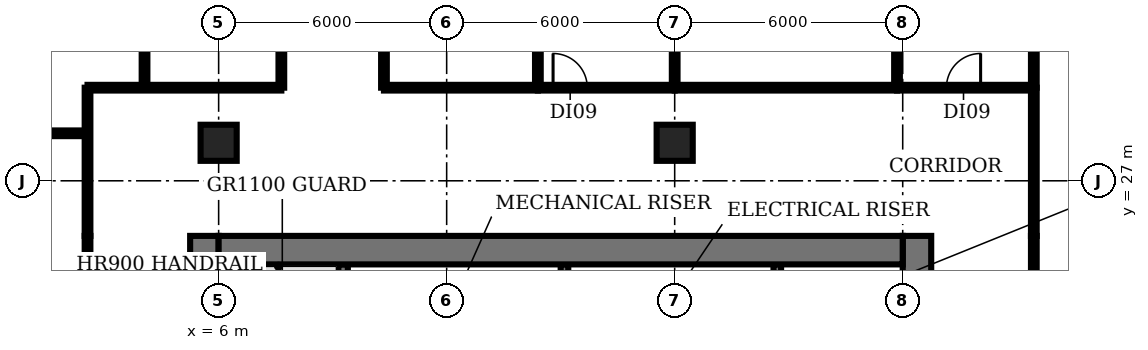
"""IFC4 building model, lengths in metres.
Left out: names, types, materials, properties, quantities, classifications, styles, units other than length and angle.
Written with IfcOpenShell. Run it as: python <this file> out.ifc"""

import sys

from ifc_helpers import new_model, si_unit, direction, frame, frame_2d, origin, origin_2d, place, context, subcontext, project, spatial, rectangle, extrude, element, fill, save


model = new_model("IFC4")
c1 = context("Model", 3, precision=1e-05, world=origin(), true_north=direction((0.0, 1.0)))
c2 = subcontext(c1, "Body", "Model", "MODEL_VIEW")
j1 = project(units=[si_unit("LENGTHUNIT", "METRE"), si_unit("PLANEANGLEUNIT", "RADIAN")], contexts=[c1])
p1 = place(None, origin())
s1 = spatial("IfcSite", under=j1, at=p1, CompositionType="ELEMENT")
p2 = place(p1, origin())
s2 = spatial("IfcBuilding", under=s1, at=p2, CompositionType="ELEMENT")
p3 = place(p2, frame((0.0, 0.0, 87.8)))
s3 = spatial("IfcBuildingStorey", under=s2, at=p3, CompositionType="ELEMENT", Elevation=87.8)
for number, where, z_axis, x_axis in (
    (1, (6.0, 28.0, -0.35), (0.0, 0.0, 1.0), (1.0, 0.0, 0.0)),
    (2, (18.0, 28.0, -0.35), (0.0, 0.0, 1.0), (1.0, 0.0, 0.0)),
):
    element("IfcColumn", number, at=place(p3, frame(where, z_axis=z_axis, x_axis=x_axis)), inside=s3, PredefinedType="COLUMN", context=c2, shape_type="SweptSolid", body=[
        extrude(rectangle(XDim=0.95, YDim=0.95, at=origin_2d()), origin(), (0.0, 0.0, 1.0), 4.2),
    ])
p4 = place(p3, frame((9.275, 18.375, 0.0), z_axis=(0.0, 0.0, 1.0), x_axis=(0.0, 1.0, 0.0)))
e3 = element("IfcWall", 3, at=p4, inside=s3, PredefinedType="SHEAR", context=c2, shape_type="SweptSolid", body=[
    extrude(rectangle(XDim=6.425, YDim=0.25, at=frame_2d((3.212, 0.0))), origin(), (0.0, 0.0, 1.0), 3.85),
])
for number, where, z_axis, x_axis in (
    (4, (15.1, 22.9, 0.0), (0.0, 0.0, 1.0), (0.0, 1.0, 0.0)),
    (5, (20.7, 22.9, 0.0), (0.0, 0.0, 1.0), (0.0, 1.0, 0.0)),
):
    element("IfcWall", number, at=place(p3, frame(where, z_axis=z_axis, x_axis=x_axis)), inside=s3, PredefinedType="SHEAR", context=c2, shape_type="SweptSolid", body=[
        extrude(rectangle(XDim=1.9, YDim=0.2, at=frame_2d((0.95, 0.0))), origin(), (0.0, 0.0, 1.0), 3.85),
    ])
p5 = place(p3, frame((5.625, 4.52, 0.0), z_axis=(0.0, 0.0, 1.0), x_axis=(0.0, 1.0, 0.0)))
e6 = element("IfcWall", 6, at=p5, inside=s3, PredefinedType="SHEAR", context=c2, shape_type="SweptSolid", body=[
    extrude(rectangle(XDim=21.03, YDim=0.75, at=frame_2d((10.515, 0.0))), origin(), (0.0, 0.0, 1.0), 3.85),
])
p6 = place(p5, frame((1.13, 0.0, 0.0)))
e7 = element("IfcOpeningElement", 7, at=p6, cuts=e6, PredefinedType="OPENING", context=c2, shape_type="SweptSolid", body=[
    extrude(rectangle(XDim=1.5, YDim=2.1, at=frame_2d((0.75, 1.05))), frame((0.0, 0.385, 0.0), z_axis=(0.0, -1.0, 0.0), x_axis=(1.0, 0.0, 0.0)), (0.0, 0.0, 1.0), 0.77),
])
p7 = place(p5, frame((7.58, 0.0, 0.0)))
e8 = element("IfcOpeningElement", 8, at=p7, cuts=e6, PredefinedType="OPENING", context=c2, shape_type="SweptSolid", body=[
    extrude(rectangle(XDim=1.2, YDim=2.1, at=frame_2d((0.6, 1.05))), frame((0.0, 0.385, 0.0), z_axis=(0.0, -1.0, 0.0), x_axis=(1.0, 0.0, 0.0)), (0.0, 0.0, 1.0), 0.77),
])
p8 = place(p5, frame((14.13, 0.0, 0.0)))
e9 = element("IfcOpeningElement", 9, at=p8, cuts=e6, PredefinedType="OPENING", context=c2, shape_type="SweptSolid", body=[
    extrude(rectangle(XDim=1.2, YDim=2.1, at=frame_2d((0.6, 1.05))), frame((0.0, 0.385, 0.0), z_axis=(0.0, -1.0, 0.0), x_axis=(1.0, 0.0, 0.0)), (0.0, 0.0, 1.0), 0.77),
])
p9 = place(p3, frame((24.375, 25.55, 0.0), z_axis=(0.0, 0.0, 1.0), x_axis=(0.0, -1.0, 0.0)))
e10 = element("IfcWall", 10, at=p9, inside=s3, PredefinedType="SHEAR", context=c2, shape_type="SweptSolid", body=[
    extrude(rectangle(XDim=21.08, YDim=0.75, at=frame_2d((10.54, 0.0))), origin(), (0.0, 0.0, 1.0), 3.85),
])
p10 = place(p9, frame((18.4, 0.0, 0.0)))
e11 = element("IfcOpeningElement", 11, at=p10, cuts=e10, PredefinedType="OPENING", context=c2, shape_type="SweptSolid", body=[
    extrude(rectangle(XDim=1.5, YDim=2.1, at=frame_2d((0.75, 1.05))), frame((0.0, 0.385, 0.0), z_axis=(0.0, -1.0, 0.0), x_axis=(1.0, 0.0, 0.0)), (0.0, 0.0, 1.0), 0.77),
])
p11 = place(p9, frame((12.3, 0.0, 0.0)))
e12 = element("IfcOpeningElement", 12, at=p11, cuts=e10, PredefinedType="OPENING", context=c2, shape_type="SweptSolid", body=[
    extrude(rectangle(XDim=0.9, YDim=2.1, at=frame_2d((0.45, 1.05))), frame((0.0, 0.385, 0.0), z_axis=(0.0, -1.0, 0.0), x_axis=(1.0, 0.0, 0.0)), (0.0, 0.0, 1.0), 0.77),
])
p12 = place(p9, frame((6.3, 0.0, 0.0)))
e13 = element("IfcOpeningElement", 13, at=p12, cuts=e10, PredefinedType="OPENING", context=c2, shape_type="SweptSolid", body=[
    extrude(rectangle(XDim=2.0, YDim=2.1, at=frame_2d((1.0, 1.05))), frame((0.0, 0.385, 0.0), z_axis=(0.0, -1.0, 0.0), x_axis=(1.0, 0.0, 0.0)), (0.0, 0.0, 1.0), 0.77),
])
p13 = place(p3, frame((6.0, 25.175, 0.0), z_axis=(0.0, 0.0, 1.0), x_axis=(1.0, 0.0, 0.0)))
e14 = element("IfcWall", 14, at=p13, inside=s3, PredefinedType="SHEAR", context=c2, shape_type="SweptSolid", body=[
    extrude(rectangle(XDim=18.0, YDim=0.75, at=frame_2d((9.0, 0.0))), origin(), (0.0, 0.0, 1.0), 3.85),
])
p14 = place(p3, frame((-1.04, 28.25, 0.0), z_axis=(0.0, 0.0, 1.0), x_axis=(1.0, 0.0, 0.0)))
e15 = element("IfcWall", 15, at=p14, inside=s3, PredefinedType="PARTITIONING", context=c2, shape_type="SweptSolid", body=[
    extrude(rectangle(XDim=3.59, YDim=0.15, at=frame_2d((1.795, 0.0))), origin(), (0.0, 0.0, 1.0), 2.83),
])
p15 = place(p3, frame((2.55, 5.999, 0.0), z_axis=(0.0, 0.0, 1.0), x_axis=(0.0, 1.0, 0.0)))
e16 = element("IfcWall", 16, at=p15, inside=s3, PredefinedType="PARTITIONING", context=c2, shape_type="SweptSolid", body=[
    extrude(rectangle(XDim=19.551, YDim=0.15, at=frame_2d((9.775, 0.0))), origin(), (0.0, 0.0, 1.0), 2.83),
])
p16 = place(p15, frame((7.651, 0.0, 0.0)))
e17 = element("IfcOpeningElement", 17, at=p16, cuts=e16, PredefinedType="OPENING", context=c2, shape_type="SweptSolid", body=[
    extrude(rectangle(XDim=1.2, YDim=2.1, at=frame_2d((0.6, 1.05))), frame((0.0, 0.085, 0.0), z_axis=(0.0, -1.0, 0.0), x_axis=(1.0, 0.0, 0.0)), (0.0, 0.0, 1.0), 0.17),
])
p17 = place(p3, frame((2.55, 25.55, 0.0), z_axis=(0.0, 0.0, 1.0), x_axis=(0.0, 1.0, 0.0)))
e18 = element("IfcWall", 18, at=p17, inside=s3, PredefinedType="PARTITIONING", context=c2, shape_type="SweptSolid", body=[
    extrude(rectangle(XDim=3.9, YDim=0.15, at=frame_2d((1.95, 0.0))), origin(), (0.0, 0.0, 1.0), 2.83),
])
p18 = place(p3, frame((2.55, 29.45, 0.0), z_axis=(0.0, 0.0, 1.0), x_axis=(1.0, 0.0, 0.0)))
e19 = element("IfcWall", 19, at=p18, inside=s3, PredefinedType="PARTITIONING", context=c2, shape_type="SweptSolid", body=[
    extrude(rectangle(XDim=5.1, YDim=0.15, at=frame_2d((2.55, 0.0))), origin(), (0.0, 0.0, 1.0), 2.83),
])
p19 = place(p3, frame((4.05, 29.45, 0.0), z_axis=(0.0, 0.0, 1.0), x_axis=(0.0, 1.0, 0.0)))
e20 = element("IfcWall", 20, at=p19, inside=s3, PredefinedType="PARTITIONING", context=c2, shape_type="SweptSolid", body=[
    extrude(rectangle(XDim=4.8, YDim=0.15, at=frame_2d((2.4, 0.0))), origin(), (0.0, 0.0, 1.0), 2.83),
])
p20 = place(p3, frame((7.65, 29.45, 0.0), z_axis=(0.0, 0.0, 1.0), x_axis=(0.0, 1.0, 0.0)))
e21 = element("IfcWall", 21, at=p20, inside=s3, PredefinedType="PARTITIONING", context=c2, shape_type="SweptSolid", body=[
    extrude(rectangle(XDim=4.8, YDim=0.15, at=frame_2d((2.4, 0.0))), origin(), (0.0, 0.0, 1.0), 2.83),
])
p21 = place(p20, frame((1.9, 0.0, 0.0)))
e22 = element("IfcOpeningElement", 22, at=p21, cuts=e21, PredefinedType="OPENING", context=c2, shape_type="SweptSolid", body=[
    extrude(rectangle(XDim=0.9, YDim=2.1, at=frame_2d((0.45, 1.05))), frame((0.0, 0.085, 0.0), z_axis=(0.0, -1.0, 0.0), x_axis=(1.0, 0.0, 0.0)), (0.0, 0.0, 1.0), 0.17),
])
p22 = place(p3, frame((10.35, 29.45, 0.0), z_axis=(0.0, 0.0, 1.0), x_axis=(0.0, 1.0, 0.0)))
e23 = element("IfcWall", 23, at=p22, inside=s3, PredefinedType="PARTITIONING", context=c2, shape_type="SweptSolid", body=[
    extrude(rectangle(XDim=4.8, YDim=0.15, at=frame_2d((2.4, 0.0))), origin(), (0.0, 0.0, 1.0), 2.83),
])
p23 = place(p3, frame((10.35, 29.45, 0.0), z_axis=(0.0, 0.0, 1.0), x_axis=(1.0, 0.0, 0.0)))
e24 = element("IfcWall", 24, at=p23, inside=s3, PredefinedType="PARTITIONING", context=c2, shape_type="SweptSolid", body=[
    extrude(rectangle(XDim=4.05, YDim=0.15, at=frame_2d((2.025, 0.0))), origin(), (0.0, 0.0, 1.0), 2.83),
])
p24 = place(p3, frame((14.4, 29.45, 0.0), z_axis=(0.0, 0.0, 1.0), x_axis=(0.0, 1.0, 0.0)))
e25 = element("IfcWall", 25, at=p24, inside=s3, PredefinedType="PARTITIONING", context=c2, shape_type="SweptSolid", body=[
    extrude(rectangle(XDim=4.8, YDim=0.15, at=frame_2d((2.4, 0.0))), origin(), (0.0, 0.0, 1.0), 2.83),
])
p25 = place(p3, frame((14.4, 29.45, 0.0), z_axis=(0.0, 0.0, 1.0), x_axis=(1.0, 0.0, 0.0)))
e26 = element("IfcWall", 26, at=p25, inside=s3, PredefinedType="PARTITIONING", context=c2, shape_type="SweptSolid", body=[
    extrude(rectangle(XDim=3.6, YDim=0.15, at=frame_2d((1.8, 0.0))), origin(), (0.0, 0.0, 1.0), 2.83),
])
p26 = place(p25, frame((0.4, 0.0, 0.0)))
e27 = element("IfcOpeningElement", 27, at=p26, cuts=e26, PredefinedType="OPENING", context=c2, shape_type="SweptSolid", body=[
    extrude(rectangle(XDim=0.9, YDim=2.1, at=frame_2d((0.45, 1.05))), frame((0.0, 0.085, 0.0), z_axis=(0.0, -1.0, 0.0), x_axis=(1.0, 0.0, 0.0)), (0.0, 0.0, 1.0), 0.17),
])
p27 = place(p3, frame((18.0, 29.45, 0.0), z_axis=(0.0, 0.0, 1.0), x_axis=(0.0, 1.0, 0.0)))
e28 = element("IfcWall", 28, at=p27, inside=s3, PredefinedType="PARTITIONING", context=c2, shape_type="SweptSolid", body=[
    extrude(rectangle(XDim=4.8, YDim=0.15, at=frame_2d((2.4, 0.0))), origin(), (0.0, 0.0, 1.0), 2.83),
])
p28 = place(p3, frame((18.0, 29.45, 0.0), z_axis=(0.0, 0.0, 1.0), x_axis=(1.0, 0.0, 0.0)))
e29 = element("IfcWall", 29, at=p28, inside=s3, PredefinedType="PARTITIONING", context=c2, shape_type="SweptSolid", body=[
    extrude(rectangle(XDim=5.85, YDim=0.15, at=frame_2d((2.925, 0.0))), origin(), (0.0, 0.0, 1.0), 2.83),
])
p29 = place(p3, frame((23.85, 29.45, 0.0), z_axis=(0.0, 0.0, 1.0), x_axis=(0.0, 1.0, 0.0)))
e30 = element("IfcWall", 30, at=p29, inside=s3, PredefinedType="PARTITIONING", context=c2, shape_type="SweptSolid", body=[
    extrude(rectangle(XDim=4.8, YDim=0.15, at=frame_2d((2.4, 0.0))), origin(), (0.0, 0.0, 1.0), 2.83),
])
p30 = place(p3, frame((23.85, 29.45, 0.0), z_axis=(0.0, 0.0, 1.0), x_axis=(1.0, 0.0, 0.0)))
e31 = element("IfcWall", 31, at=p30, inside=s3, PredefinedType="PARTITIONING", context=c2, shape_type="SweptSolid", body=[
    extrude(rectangle(XDim=3.6, YDim=0.15, at=frame_2d((1.8, 0.0))), origin(), (0.0, 0.0, 1.0), 2.83),
])
p31 = place(p30, frame((1.3, 0.0, 0.0)))
e32 = element("IfcOpeningElement", 32, at=p31, cuts=e31, PredefinedType="OPENING", context=c2, shape_type="SweptSolid", body=[
    extrude(rectangle(XDim=0.9, YDim=2.1, at=frame_2d((0.45, 1.05))), frame((0.0, 0.085, 0.0), z_axis=(0.0, -1.0, 0.0), x_axis=(1.0, 0.0, 0.0)), (0.0, 0.0, 1.0), 0.17),
])
p32 = place(p3, frame((27.45, 25.55, 0.0), z_axis=(0.0, 0.0, 1.0), x_axis=(0.0, -1.0, 0.0)))
e33 = element("IfcWall", 33, at=p32, inside=s3, PredefinedType="PARTITIONING", context=c2, shape_type="SweptSolid", body=[
    extrude(rectangle(XDim=16.45, YDim=0.15, at=frame_2d((8.225, 0.0))), origin(), (0.0, 0.0, 1.0), 2.83),
])
p33 = place(p32, frame((7.55, 0.0, 0.0)))
e34 = element("IfcOpeningElement", 34, at=p33, cuts=e33, PredefinedType="OPENING", context=c2, shape_type="SweptSolid", body=[
    extrude(rectangle(XDim=1.2, YDim=2.1, at=frame_2d((0.6, 1.05))), frame((0.0, 0.085, 0.0), z_axis=(0.0, -1.0, 0.0), x_axis=(1.0, 0.0, 0.0)), (0.0, 0.0, 1.0), 0.17),
])
p34 = place(p3, frame((27.45, 25.55, 0.0), z_axis=(0.0, 0.0, 1.0), x_axis=(0.0, 1.0, 0.0)))
e35 = element("IfcWall", 35, at=p34, inside=s3, PredefinedType="PARTITIONING", context=c2, shape_type="SweptSolid", body=[
    extrude(rectangle(XDim=3.9, YDim=0.15, at=frame_2d((1.95, 0.0))), origin(), (0.0, 0.0, 1.0), 2.83),
])
p35 = place(p3, frame((27.45, 29.45, 0.0), z_axis=(0.0, 0.0, 1.0), x_axis=(0.0, 1.0, 0.0)))
e36 = element("IfcWall", 36, at=p35, inside=s3, PredefinedType="PARTITIONING", context=c2, shape_type="SweptSolid", body=[
    extrude(rectangle(XDim=3.1, YDim=0.15, at=frame_2d((1.55, 0.0))), origin(), (0.0, 0.0, 1.0), 2.83),
])
p36 = place(p26, origin())
e37 = element("IfcDoor", 37, at=p36, inside=s3, OperationType="SINGLE_SWING_LEFT", PredefinedType="DOOR", context=c2, shape_type="SweptSolid", body=[
    extrude(rectangle(XDim=0.9, YDim=2.1, at=frame_2d((0.45, 1.05))), frame((0.0, 0.025, 0.0), z_axis=(0.0, -1.0, 0.0), x_axis=(1.0, 0.0, 0.0)), (0.0, 0.0, 1.0), 0.05),
])
fill(e27, e37)
p37 = place(p31, origin())
e38 = element("IfcDoor", 38, at=p37, inside=s3, OperationType="SINGLE_SWING_RIGHT", PredefinedType="DOOR", context=c2, shape_type="SweptSolid", body=[
    extrude(rectangle(XDim=0.9, YDim=2.1, at=frame_2d((0.45, 1.05))), frame((0.0, 0.025, 0.0), z_axis=(0.0, -1.0, 0.0), x_axis=(1.0, 0.0, 0.0)), (0.0, 0.0, 1.0), 0.05),
])
fill(e32, e38)
save(model, sys.argv[1])
